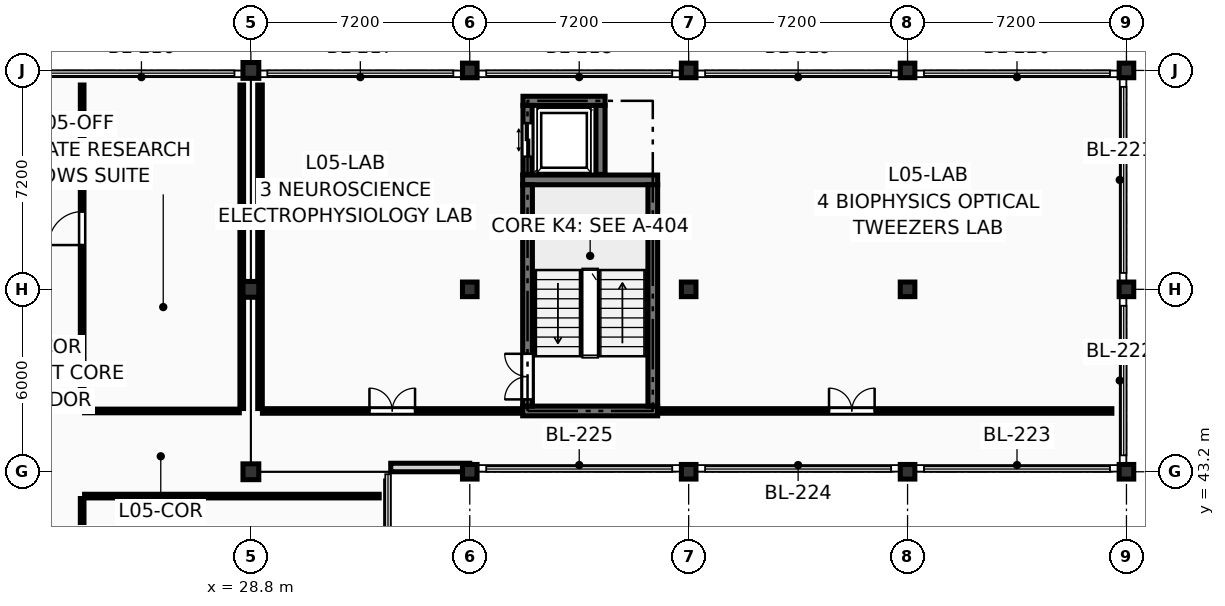
"""IFC4 building model, lengths in metres.
Left out: names, types, materials, properties, quantities, classifications, styles, units other than length and angle.
Written with IfcOpenShell. Run it as: python <this file> out.ifc"""

import sys

from ifc_helpers import new_model, si_unit, direction, frame, frame_2d, origin, origin_2d, place, context, subcontext, project, spatial, rectangle, extrude, element, fill, save


model = new_model("IFC4")
c1 = context("Model", 3, precision=1e-05, world=origin(), true_north=direction((0.0, 1.0)))
c2 = subcontext(c1, "Body", "Model", "MODEL_VIEW")
j1 = project(units=[si_unit("LENGTHUNIT", "METRE"), si_unit("PLANEANGLEUNIT", "RADIAN")], contexts=[c1])
p1 = place(None, origin())
s1 = spatial("IfcSite", under=j1, at=p1, CompositionType="ELEMENT")
p2 = place(p1, origin())
s2 = spatial("IfcBuilding", under=s1, at=p2, CompositionType="ELEMENT")
p3 = place(p2, frame((0.0, 0.0, 19.35)))
s3 = spatial("IfcBuildingStorey", under=s2, at=p3, CompositionType="ELEMENT", Elevation=19.35)
for number, where, z_axis, x_axis in (
    (1, (28.8, 43.2, 0.0), (0.0, 0.0, 1.0), (1.0, 0.0, 0.0)),
    (2, (28.8, 49.2, 0.0), (0.0, 0.0, 1.0), (1.0, 0.0, 0.0)),
    (3, (28.8, 56.4, 0.0), (0.0, 0.0, 1.0), (1.0, 0.0, 0.0)),
):
    element("IfcColumn", number, at=place(p3, frame(where, z_axis=z_axis, x_axis=x_axis)), inside=s3, PredefinedType="COLUMN", context=c2, shape_type="SweptSolid", body=[
        extrude(rectangle(XDim=0.52, YDim=0.52, at=origin_2d()), origin(), (0.0, 0.0, 1.0), 3.6),
    ])
for number, where, z_axis, x_axis in (
    (4, (36.0, 43.2, 0.0), (0.0, 0.0, 1.0), (1.0, 0.0, 0.0)),
    (5, (36.0, 49.2, 0.0), (0.0, 0.0, 1.0), (1.0, 0.0, 0.0)),
    (6, (36.0, 56.4, 0.0), (0.0, 0.0, 1.0), (1.0, 0.0, 0.0)),
    (7, (43.2, 43.2, 0.0), (0.0, 0.0, 1.0), (1.0, 0.0, 0.0)),
    (8, (43.2, 49.2, 0.0), (0.0, 0.0, 1.0), (1.0, 0.0, 0.0)),
    (9, (43.2, 56.4, 0.0), (0.0, 0.0, 1.0), (1.0, 0.0, 0.0)),
    (10, (50.4, 43.2, 0.0), (0.0, 0.0, 1.0), (1.0, 0.0, 0.0)),
    (11, (50.4, 49.2, 0.0), (0.0, 0.0, 1.0), (1.0, 0.0, 0.0)),
    (12, (50.4, 56.4, 0.0), (0.0, 0.0, 1.0), (1.0, 0.0, 0.0)),
    (13, (57.6, 43.2, 0.0), (0.0, 0.0, 1.0), (1.0, 0.0, 0.0)),
    (14, (57.6, 49.2, 0.0), (0.0, 0.0, 1.0), (1.0, 0.0, 0.0)),
    (15, (57.6, 56.4, 0.0), (0.0, 0.0, 1.0), (1.0, 0.0, 0.0)),
):
    element("IfcColumn", number, at=place(p3, frame(where, z_axis=z_axis, x_axis=x_axis)), inside=s3, PredefinedType="COLUMN", context=c2, shape_type="SweptSolid", body=[
        extrude(rectangle(XDim=0.48, YDim=0.48, at=origin_2d()), origin(), (0.0, 0.0, 1.0), 3.6),
    ])
p4 = place(p3, frame((33.4, 43.34, 0.0), z_axis=(0.0, 0.0, 1.0), x_axis=(1.0, 0.0, 0.0)))
e16 = element("IfcWall", 16, at=p4, inside=s3, PredefinedType="SOLIDWALL", context=c2, shape_type="SweptSolid", body=[
    extrude(rectangle(XDim=2.6, YDim=0.28, at=frame_2d((1.3, 0.0))), origin(), (0.0, 0.0, 1.0), 3.38),
])
for number, where, z_axis, x_axis in (
    (17, (37.74, 45.2, 0.0), (0.0, 0.0, 1.0), (1.0, 0.0, 0.0)),
    (18, (37.74, 52.8, 0.0), (0.0, 0.0, 1.0), (1.0, 0.0, 0.0)),
):
    element("IfcWall", number, at=place(p3, frame(where, z_axis=z_axis, x_axis=x_axis)), inside=s3, PredefinedType="SHEAR", context=c2, shape_type="SweptSolid", body=[
        extrude(rectangle(XDim=4.44, YDim=0.32, at=frame_2d((2.22, 0.0))), origin(), (0.0, 0.0, 1.0), 3.39),
    ])
p5 = place(p3, frame((37.9, 45.36, 0.0), z_axis=(0.0, 0.0, 1.0), x_axis=(0.0, 1.0, 0.0)))
e19 = element("IfcWall", 19, at=p5, inside=s3, PredefinedType="SHEAR", context=c2, shape_type="SweptSolid", body=[
    extrude(rectangle(XDim=7.28, YDim=0.32, at=frame_2d((3.64, 0.0))), origin(), (0.0, 0.0, 1.0), 3.39),
])
p6 = place(p5, frame((0.22, 0.0, 0.0)))
e20 = element("IfcOpeningElement", 20, at=p6, cuts=e19, PredefinedType="OPENING", context=c2, shape_type="SweptSolid", body=[
    extrude(rectangle(XDim=1.5, YDim=2.2, at=frame_2d((0.75, 1.1))), frame((0.0, 0.172, 0.0), z_axis=(0.0, -1.0, 0.0), x_axis=(1.0, 0.0, 0.0)), (0.0, 0.0, 1.0), 0.344),
])
p7 = place(p3, frame((42.02, 45.36, 0.0), z_axis=(0.0, 0.0, 1.0), x_axis=(0.0, 1.0, 0.0)))
e21 = element("IfcWall", 21, at=p7, inside=s3, PredefinedType="SHEAR", context=c2, shape_type="SweptSolid", body=[
    extrude(rectangle(XDim=7.28, YDim=0.32, at=frame_2d((3.64, 0.0))), origin(), (0.0, 0.0, 1.0), 3.39),
])
p8 = place(p3, frame((37.75, 55.4, 0.0), z_axis=(0.0, 0.0, 1.0), x_axis=(1.0, 0.0, 0.0)))
e22 = element("IfcWall", 22, at=p8, inside=s3, PredefinedType="SHEAR", context=c2, shape_type="SweptSolid", body=[
    extrude(rectangle(XDim=2.7, YDim=0.3, at=frame_2d((1.35, 0.0))), origin(), (0.0, 0.0, 1.0), 3.39),
])
p9 = place(p3, frame((37.9, 52.98, 0.0), z_axis=(0.0, 0.0, 1.0), x_axis=(0.0, 1.0, 0.0)))
e23 = element("IfcWall", 23, at=p9, inside=s3, PredefinedType="SHEAR", context=c2, shape_type="SweptSolid", body=[
    extrude(rectangle(XDim=2.27, YDim=0.3, at=frame_2d((1.135, 0.0))), origin(), (0.0, 0.0, 1.0), 3.39),
])
p10 = place(p9, frame((0.585, 0.0, 0.0)))
e24 = element("IfcOpeningElement", 24, at=p10, cuts=e23, PredefinedType="OPENING", context=c2, shape_type="SweptSolid", body=[
    extrude(rectangle(XDim=1.1, YDim=2.2, at=frame_2d((0.55, 1.1))), frame((0.0, 0.162, 0.0), z_axis=(0.0, -1.0, 0.0), x_axis=(1.0, 0.0, 0.0)), (0.0, 0.0, 1.0), 0.324),
])
p11 = place(p3, frame((40.3, 52.98, 0.0), z_axis=(0.0, 0.0, 1.0), x_axis=(0.0, 1.0, 0.0)))
e25 = element("IfcWall", 25, at=p11, inside=s3, PredefinedType="SHEAR", context=c2, shape_type="SweptSolid", body=[
    extrude(rectangle(XDim=2.27, YDim=0.3, at=frame_2d((1.135, 0.0))), origin(), (0.0, 0.0, 1.0), 3.39),
])
p12 = place(p3, frame((23.25, 28.98, 0.0), z_axis=(0.0, 0.0, 1.0), x_axis=(0.0, 1.0, 0.0)))
e26 = element("IfcWall", 26, at=p12, inside=s3, PredefinedType="PARTITIONING", context=c2, shape_type="SweptSolid", body=[
    extrude(rectangle(XDim=13.34, YDim=0.12, at=frame_2d((6.67, 0.0))), origin(), (0.0, 0.0, 1.0), 3.375),
])
p13 = place(p12, frame((4.364, 0.0, 0.0)))
e27 = element("IfcOpeningElement", 27, at=p13, cuts=e26, PredefinedType="OPENING", context=c2, shape_type="SweptSolid", body=[
    extrude(rectangle(XDim=1.2, YDim=2.15, at=frame_2d((0.6, 1.075))), frame((0.0, 0.072, 0.0), z_axis=(0.0, -1.0, 0.0), x_axis=(1.0, 0.0, 0.0)), (0.0, 0.0, 1.0), 0.144),
])
p14 = place(p3, frame((23.33, 42.4, 0.0), z_axis=(0.0, 0.0, 1.0), x_axis=(1.0, 0.0, 0.0)))
e28 = element("IfcWall", 28, at=p14, inside=s3, PredefinedType="PARTITIONING", context=c2, shape_type="SweptSolid", body=[
    extrude(rectangle(XDim=9.69, YDim=0.12, at=frame_2d((4.845, 0.0))), origin(), (0.0, 0.0, 1.0), 3.375),
])
p15 = place(p3, frame((29.1, 45.28, 0.0), z_axis=(0.0, 0.0, 1.0), x_axis=(0.0, 1.0, 0.0)))
e29 = element("IfcWall", 29, at=p15, inside=s3, PredefinedType="PARTITIONING", context=c2, shape_type="SweptSolid", body=[
    extrude(rectangle(XDim=10.64, YDim=0.15, at=frame_2d((5.32, 0.0))), origin(), (0.0, 0.0, 1.0), 2.715),
])
p16 = place(p3, frame((29.18, 45.2, 0.0), z_axis=(0.0, 0.0, 1.0), x_axis=(1.0, 0.0, 0.0)))
e30 = element("IfcWall", 30, at=p16, inside=s3, PredefinedType="PARTITIONING", context=c2, shape_type="SweptSolid", body=[
    extrude(rectangle(XDim=8.54, YDim=0.15, at=frame_2d((4.27, 0.0))), origin(), (0.0, 0.0, 1.0), 3.375),
])
p17 = place(p16, frame((3.52, 0.0, 0.0)))
e31 = element("IfcOpeningElement", 31, at=p17, cuts=e30, PredefinedType="OPENING", context=c2, shape_type="SweptSolid", body=[
    extrude(rectangle(XDim=1.5, YDim=2.2, at=frame_2d((0.75, 1.1))), frame((0.0, 0.087, 0.0), z_axis=(0.0, -1.0, 0.0), x_axis=(1.0, 0.0, 0.0)), (0.0, 0.0, 1.0), 0.174),
])
p18 = place(p3, frame((42.18, 45.2, 0.0), z_axis=(0.0, 0.0, 1.0), x_axis=(1.0, 0.0, 0.0)))
e32 = element("IfcWall", 32, at=p18, inside=s3, PredefinedType="PARTITIONING", context=c2, shape_type="SweptSolid", body=[
    extrude(rectangle(XDim=14.94, YDim=0.15, at=frame_2d((7.47, 0.0))), origin(), (0.0, 0.0, 1.0), 3.375),
])
p19 = place(p18, frame((5.637, 0.0, 0.0)))
e33 = element("IfcOpeningElement", 33, at=p19, cuts=e32, PredefinedType="OPENING", context=c2, shape_type="SweptSolid", body=[
    extrude(rectangle(XDim=1.5, YDim=2.2, at=frame_2d((0.75, 1.1))), frame((0.0, 0.087, 0.0), z_axis=(0.0, -1.0, 0.0), x_axis=(1.0, 0.0, 0.0)), (0.0, 0.0, 1.0), 0.174),
])
p20 = place(p3, frame((23.25, 45.28, 0.0), z_axis=(0.0, 0.0, 1.0), x_axis=(0.0, 1.0, 0.0)))
e34 = element("IfcWall", 34, at=p20, inside=s3, PredefinedType="PARTITIONING", context=c2, shape_type="SweptSolid", body=[
    extrude(rectangle(XDim=10.64, YDim=0.12, at=frame_2d((5.32, 0.0))), origin(), (0.0, 0.0, 1.0), 3.375),
])
p21 = place(p20, frame((5.377, 0.0, 0.0)))
e35 = element("IfcOpeningElement", 35, at=p21, cuts=e34, PredefinedType="OPENING", context=c2, shape_type="SweptSolid", body=[
    extrude(rectangle(XDim=1.1, YDim=2.15, at=frame_2d((0.55, 1.075))), frame((0.0, 0.072, 0.0), z_axis=(0.0, -1.0, 0.0), x_axis=(1.0, 0.0, 0.0)), (0.0, 0.0, 1.0), 0.144),
])
p22 = place(p3, frame((23.33, 45.2, 0.0), z_axis=(0.0, 0.0, 1.0), x_axis=(1.0, 0.0, 0.0)))
e36 = element("IfcWall", 36, at=p22, inside=s3, PredefinedType="PARTITIONING", context=c2, shape_type="SweptSolid", body=[
    extrude(rectangle(XDim=5.09, YDim=0.12, at=frame_2d((2.545, 0.0))), origin(), (0.0, 0.0, 1.0), 3.375),
])
p23 = place(p3, frame((28.5, 45.28, 0.0), z_axis=(0.0, 0.0, 1.0), x_axis=(0.0, 1.0, 0.0)))
e37 = element("IfcWall", 37, at=p23, inside=s3, PredefinedType="PARTITIONING", context=c2, shape_type="SweptSolid", body=[
    extrude(rectangle(XDim=10.64, YDim=0.12, at=frame_2d((5.32, 0.0))), origin(), (0.0, 0.0, 1.0), 2.715),
])
p24 = place(p6, origin())
e38 = element("IfcDoor", 38, at=p24, inside=s3, OperationType="DOUBLE_DOOR_SINGLE_SWING", PredefinedType="DOOR", context=c2, shape_type="SweptSolid", body=[
    extrude(rectangle(XDim=1.5, YDim=2.2, at=frame_2d((0.75, 1.1))), frame((0.0, 0.025, 0.0), z_axis=(0.0, -1.0, 0.0), x_axis=(1.0, 0.0, 0.0)), (0.0, 0.0, 1.0), 0.05),
])
fill(e20, e38)
p25 = place(p10, origin())
e39 = element("IfcDoor", 39, at=p25, inside=s3, OperationType="DOUBLE_DOOR_SLIDING", PredefinedType="DOOR", context=c2, shape_type="SweptSolid", body=[
    extrude(rectangle(XDim=1.1, YDim=2.2, at=frame_2d((0.55, 1.1))), frame((0.0, 0.025, 0.0), z_axis=(0.0, -1.0, 0.0), x_axis=(1.0, 0.0, 0.0)), (0.0, 0.0, 1.0), 0.05),
])
fill(e24, e39)
p26 = place(p17, origin())
e40 = element("IfcDoor", 40, at=p26, inside=s3, OperationType="DOUBLE_DOOR_SINGLE_SWING", PredefinedType="DOOR", context=c2, shape_type="SweptSolid", body=[
    extrude(rectangle(XDim=1.5, YDim=2.2, at=frame_2d((0.75, 1.1))), frame((0.0, 0.025, 0.0), z_axis=(0.0, -1.0, 0.0), x_axis=(1.0, 0.0, 0.0)), (0.0, 0.0, 1.0), 0.05),
])
fill(e31, e40)
p27 = place(p19, origin())
e41 = element("IfcDoor", 41, at=p27, inside=s3, OperationType="DOUBLE_DOOR_SINGLE_SWING", PredefinedType="DOOR", context=c2, shape_type="SweptSolid", body=[
    extrude(rectangle(XDim=1.5, YDim=2.2, at=frame_2d((0.75, 1.1))), frame((0.0, 0.025, 0.0), z_axis=(0.0, -1.0, 0.0), x_axis=(1.0, 0.0, 0.0)), (0.0, 0.0, 1.0), 0.05),
])
fill(e33, e41)
p28 = place(p21, origin())
e42 = element("IfcDoor", 42, at=p28, inside=s3, OperationType="SINGLE_SWING_LEFT", PredefinedType="DOOR", context=c2, shape_type="SweptSolid", body=[
    extrude(rectangle(XDim=1.1, YDim=2.15, at=frame_2d((0.55, 1.075))), frame((0.0, 0.025, 0.0), z_axis=(0.0, -1.0, 0.0), x_axis=(1.0, 0.0, 0.0)), (0.0, 0.0, 1.0), 0.05),
])
fill(e35, e42)
save(model, sys.argv[1])
